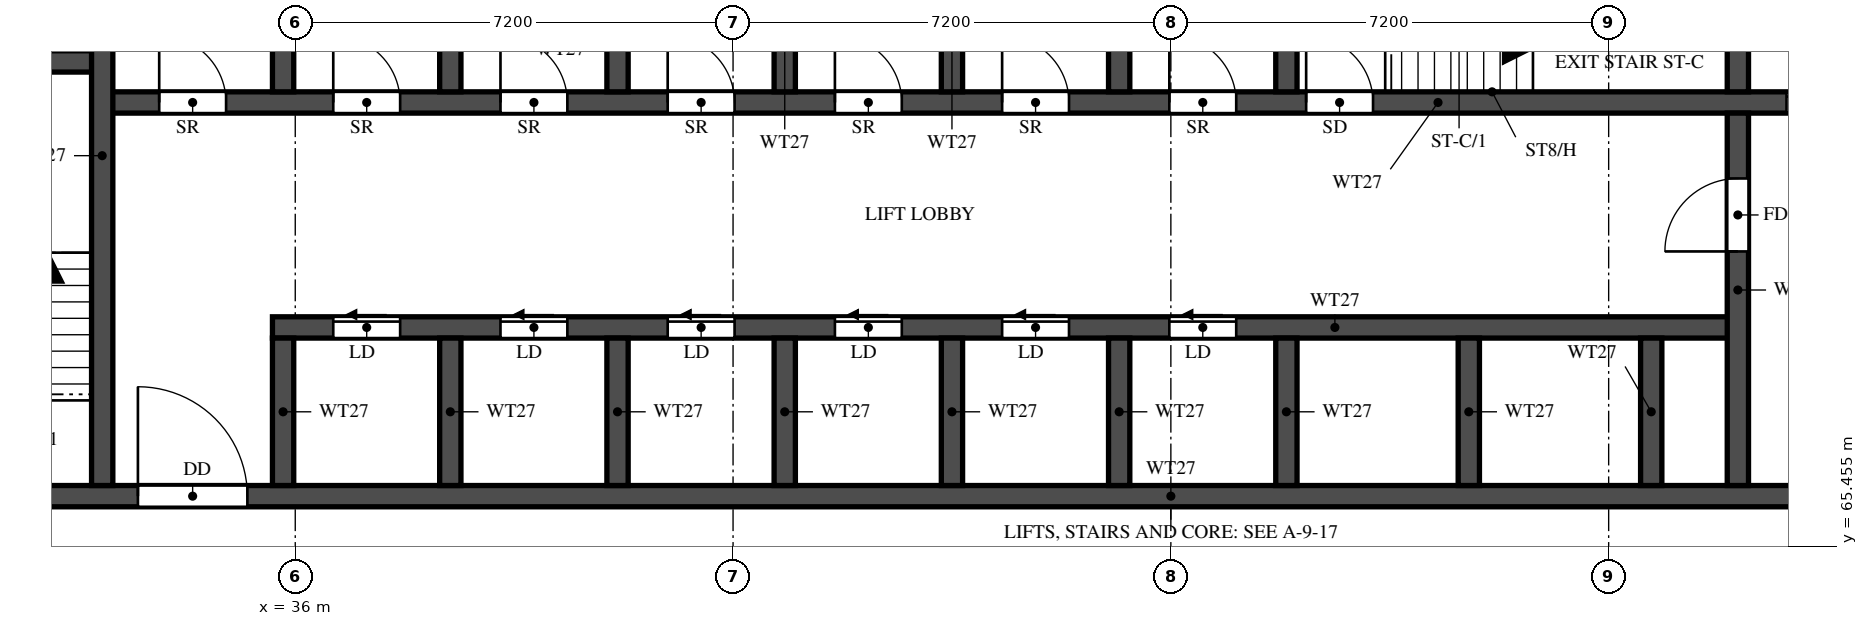
"""IFC4 building model, lengths in metres.
Left out: names, types, materials, properties, quantities, classifications, styles, units other than length and angle.
Written with IfcOpenShell. Run it as: python <this file> out.ifc"""

import sys

from ifc_helpers import new_model, si_unit, direction, frame, frame_2d, origin, place, context, subcontext, project, spatial, rectangle, extrude, element, fill, save


model = new_model("IFC4")
c1 = context("Model", 3, precision=1e-05, world=origin(), true_north=direction((0.0, 1.0)))
c2 = subcontext(c1, "Body", "Model", "MODEL_VIEW")
j1 = project(units=[si_unit("LENGTHUNIT", "METRE"), si_unit("PLANEANGLEUNIT", "RADIAN")], contexts=[c1])
p1 = place(None, origin())
s1 = spatial("IfcSite", under=j1, at=p1, CompositionType="ELEMENT")
p2 = place(p1, origin())
s2 = spatial("IfcBuilding", under=s1, at=p2, CompositionType="ELEMENT")
p3 = place(p2, frame((0.0, 0.0, 113.0)))
s3 = spatial("IfcBuildingStorey", under=s2, at=p3, CompositionType="ELEMENT", Elevation=113.0)
p4 = place(p3, frame((29.7, 66.275, 0.0), z_axis=(0.0, 0.0, 1.0), x_axis=(1.0, 0.0, 0.0)))
e1 = element("IfcWall", 1, at=p4, inside=s3, PredefinedType="SHEAR", context=c2, shape_type="SweptSolid", body=[
    extrude(rectangle(XDim=41.4, YDim=0.35, at=frame_2d((20.7, 0.0))), origin(), (0.0, 0.0, 1.0), 3.2),
])
p5 = place(p4, frame((0.925, 0.0, 0.0)))
e2 = element("IfcOpeningElement", 2, at=p5, cuts=e1, PredefinedType="OPENING", context=c2, shape_type="SweptSolid", body=[
    extrude(rectangle(XDim=1.1, YDim=2.1, at=frame_2d((0.55, 1.05))), frame((0.0, 0.185, 0.0), z_axis=(0.0, -1.0, 0.0), x_axis=(1.0, 0.0, 0.0)), (0.0, 0.0, 1.0), 0.37),
])
p6 = place(p4, frame((3.712, 0.0, 0.0)))
e3 = element("IfcOpeningElement", 3, at=p6, cuts=e1, PredefinedType="OPENING", context=c2, shape_type="SweptSolid", body=[
    extrude(rectangle(XDim=1.8, YDim=2.1, at=frame_2d((0.9, 1.05))), frame((0.0, 0.185, 0.0), z_axis=(0.0, -1.0, 0.0), x_axis=(1.0, 0.0, 0.0)), (0.0, 0.0, 1.0), 0.37),
])
p7 = place(p3, frame((35.625, 69.05, 0.0), z_axis=(0.0, 0.0, 1.0), x_axis=(1.0, 0.0, 0.0)))
e4 = element("IfcWall", 4, at=p7, inside=s3, PredefinedType="SHEAR", context=c2, shape_type="SweptSolid", body=[
    extrude(rectangle(XDim=24.1, YDim=0.35, at=frame_2d((12.05, 0.0))), origin(), (0.0, 0.0, 1.0), 3.2),
])
p8 = place(p7, frame((1.0, 0.0, 0.0)))
e5 = element("IfcOpeningElement", 5, at=p8, cuts=e4, PredefinedType="OPENING", context=c2, shape_type="SweptSolid", body=[
    extrude(rectangle(XDim=1.1, YDim=2.1, at=frame_2d((0.55, 1.05))), frame((0.0, 0.185, 0.0), z_axis=(0.0, -1.0, 0.0), x_axis=(1.0, 0.0, 0.0)), (0.0, 0.0, 1.0), 0.37),
])
p9 = place(p7, frame((3.75, 0.0, 0.0)))
e6 = element("IfcOpeningElement", 6, at=p9, cuts=e4, PredefinedType="OPENING", context=c2, shape_type="SweptSolid", body=[
    extrude(rectangle(XDim=1.1, YDim=2.1, at=frame_2d((0.55, 1.05))), frame((0.0, 0.185, 0.0), z_axis=(0.0, -1.0, 0.0), x_axis=(1.0, 0.0, 0.0)), (0.0, 0.0, 1.0), 0.37),
])
p10 = place(p7, frame((6.5, 0.0, 0.0)))
e7 = element("IfcOpeningElement", 7, at=p10, cuts=e4, PredefinedType="OPENING", context=c2, shape_type="SweptSolid", body=[
    extrude(rectangle(XDim=1.1, YDim=2.1, at=frame_2d((0.55, 1.05))), frame((0.0, 0.185, 0.0), z_axis=(0.0, -1.0, 0.0), x_axis=(1.0, 0.0, 0.0)), (0.0, 0.0, 1.0), 0.37),
])
p11 = place(p7, frame((9.25, 0.0, 0.0)))
e8 = element("IfcOpeningElement", 8, at=p11, cuts=e4, PredefinedType="OPENING", context=c2, shape_type="SweptSolid", body=[
    extrude(rectangle(XDim=1.1, YDim=2.1, at=frame_2d((0.55, 1.05))), frame((0.0, 0.185, 0.0), z_axis=(0.0, -1.0, 0.0), x_axis=(1.0, 0.0, 0.0)), (0.0, 0.0, 1.0), 0.37),
])
p12 = place(p7, frame((12.0, 0.0, 0.0)))
e9 = element("IfcOpeningElement", 9, at=p12, cuts=e4, PredefinedType="OPENING", context=c2, shape_type="SweptSolid", body=[
    extrude(rectangle(XDim=1.1, YDim=2.1, at=frame_2d((0.55, 1.05))), frame((0.0, 0.185, 0.0), z_axis=(0.0, -1.0, 0.0), x_axis=(1.0, 0.0, 0.0)), (0.0, 0.0, 1.0), 0.37),
])
p13 = place(p7, frame((14.75, 0.0, 0.0)))
e10 = element("IfcOpeningElement", 10, at=p13, cuts=e4, PredefinedType="OPENING", context=c2, shape_type="SweptSolid", body=[
    extrude(rectangle(XDim=1.1, YDim=2.1, at=frame_2d((0.55, 1.05))), frame((0.0, 0.185, 0.0), z_axis=(0.0, -1.0, 0.0), x_axis=(1.0, 0.0, 0.0)), (0.0, 0.0, 1.0), 0.37),
])
p14 = place(p3, frame((32.825, 72.75, 0.0), z_axis=(0.0, 0.0, 1.0), x_axis=(1.0, 0.0, 0.0)))
e11 = element("IfcWall", 11, at=p14, inside=s3, PredefinedType="SHEAR", context=c2, shape_type="SweptSolid", body=[
    extrude(rectangle(XDim=35.15, YDim=0.35, at=frame_2d((17.575, 0.0))), origin(), (0.0, 0.0, 1.0), 3.2),
])
p15 = place(p14, frame((19.8, 0.0, 0.0)))
e12 = element("IfcOpeningElement", 12, at=p15, cuts=e11, PredefinedType="OPENING", context=c2, shape_type="SweptSolid", body=[
    extrude(rectangle(XDim=1.1, YDim=2.1, at=frame_2d((0.55, 1.05))), frame((0.0, 0.185, 0.0), z_axis=(0.0, -1.0, 0.0), x_axis=(1.0, 0.0, 0.0)), (0.0, 0.0, 1.0), 0.37),
])
p16 = place(p14, frame((27.7, 0.0, 0.0)))
e13 = element("IfcOpeningElement", 13, at=p16, cuts=e11, PredefinedType="OPENING", context=c2, shape_type="SweptSolid", body=[
    extrude(rectangle(XDim=1.1, YDim=2.1, at=frame_2d((0.55, 1.05))), frame((0.0, 0.185, 0.0), z_axis=(0.0, -1.0, 0.0), x_axis=(1.0, 0.0, 0.0)), (0.0, 0.0, 1.0), 0.37),
])
p17 = place(p14, frame((30.3, 0.0, 0.0)))
e14 = element("IfcOpeningElement", 14, at=p17, cuts=e11, PredefinedType="OPENING", context=c2, shape_type="SweptSolid", body=[
    extrude(rectangle(XDim=1.1, YDim=2.1, at=frame_2d((0.55, 1.05))), frame((0.0, 0.185, 0.0), z_axis=(0.0, -1.0, 0.0), x_axis=(1.0, 0.0, 0.0)), (0.0, 0.0, 1.0), 0.37),
])
p18 = place(p14, frame((3.8, 0.0, 0.0)))
e15 = element("IfcOpeningElement", 15, at=p18, cuts=e11, PredefinedType="OPENING", context=c2, shape_type="SweptSolid", body=[
    extrude(rectangle(XDim=1.1, YDim=2.1, at=frame_2d((0.55, 1.05))), frame((0.0, 0.185, 0.0), z_axis=(0.0, -1.0, 0.0), x_axis=(1.0, 0.0, 0.0)), (0.0, 0.0, 1.0), 0.37),
])
p19 = place(p14, frame((6.55, 0.0, 0.0)))
e16 = element("IfcOpeningElement", 16, at=p19, cuts=e11, PredefinedType="OPENING", context=c2, shape_type="SweptSolid", body=[
    extrude(rectangle(XDim=1.1, YDim=2.1, at=frame_2d((0.55, 1.05))), frame((0.0, 0.185, 0.0), z_axis=(0.0, -1.0, 0.0), x_axis=(1.0, 0.0, 0.0)), (0.0, 0.0, 1.0), 0.37),
])
p20 = place(p14, frame((9.3, 0.0, 0.0)))
e17 = element("IfcOpeningElement", 17, at=p20, cuts=e11, PredefinedType="OPENING", context=c2, shape_type="SweptSolid", body=[
    extrude(rectangle(XDim=1.1, YDim=2.1, at=frame_2d((0.55, 1.05))), frame((0.0, 0.185, 0.0), z_axis=(0.0, -1.0, 0.0), x_axis=(1.0, 0.0, 0.0)), (0.0, 0.0, 1.0), 0.37),
])
p21 = place(p14, frame((12.05, 0.0, 0.0)))
e18 = element("IfcOpeningElement", 18, at=p21, cuts=e11, PredefinedType="OPENING", context=c2, shape_type="SweptSolid", body=[
    extrude(rectangle(XDim=1.1, YDim=2.1, at=frame_2d((0.55, 1.05))), frame((0.0, 0.185, 0.0), z_axis=(0.0, -1.0, 0.0), x_axis=(1.0, 0.0, 0.0)), (0.0, 0.0, 1.0), 0.37),
])
p22 = place(p14, frame((14.8, 0.0, 0.0)))
e19 = element("IfcOpeningElement", 19, at=p22, cuts=e11, PredefinedType="OPENING", context=c2, shape_type="SweptSolid", body=[
    extrude(rectangle(XDim=1.1, YDim=2.1, at=frame_2d((0.55, 1.05))), frame((0.0, 0.185, 0.0), z_axis=(0.0, -1.0, 0.0), x_axis=(1.0, 0.0, 0.0)), (0.0, 0.0, 1.0), 0.37),
])
p23 = place(p14, frame((17.55, 0.0, 0.0)))
e20 = element("IfcOpeningElement", 20, at=p23, cuts=e11, PredefinedType="OPENING", context=c2, shape_type="SweptSolid", body=[
    extrude(rectangle(XDim=1.1, YDim=2.1, at=frame_2d((0.55, 1.05))), frame((0.0, 0.185, 0.0), z_axis=(0.0, -1.0, 0.0), x_axis=(1.0, 0.0, 0.0)), (0.0, 0.0, 1.0), 0.37),
])
p24 = place(p14, frame((0.938, 0.0, 0.0)))
e21 = element("IfcOpeningElement", 21, at=p24, cuts=e11, PredefinedType="OPENING", context=c2, shape_type="SweptSolid", body=[
    extrude(rectangle(XDim=1.1, YDim=2.1, at=frame_2d((0.55, 1.05))), frame((0.0, 0.185, 0.0), z_axis=(0.0, -1.0, 0.0), x_axis=(1.0, 0.0, 0.0)), (0.0, 0.0, 1.0), 0.37),
])
p25 = place(p3, frame((29.7, 73.425, 0.0), z_axis=(0.0, 0.0, 1.0), x_axis=(1.0, 0.0, 0.0)))
e22 = element("IfcWall", 22, at=p25, inside=s3, PredefinedType="SHEAR", context=c2, shape_type="SweptSolid", body=[
    extrude(rectangle(XDim=3.125, YDim=0.35, at=frame_2d((1.562, 0.0))), origin(), (0.0, 0.0, 1.0), 3.2),
])
p26 = place(p3, frame((32.825, 66.45, 0.0), z_axis=(0.0, 0.0, 1.0), x_axis=(0.0, 1.0, 0.0)))
e23 = element("IfcWall", 23, at=p26, inside=s3, PredefinedType="SHEAR", context=c2, shape_type="SweptSolid", body=[
    extrude(rectangle(XDim=10.85, YDim=0.35, at=frame_2d((5.425, 0.0))), origin(), (0.0, 0.0, 1.0), 3.2),
])
p27 = place(p3, frame((59.725, 66.45, 0.0), z_axis=(0.0, 0.0, 1.0), x_axis=(0.0, 1.0, 0.0)))
e24 = element("IfcWall", 24, at=p27, inside=s3, PredefinedType="SHEAR", context=c2, shape_type="SweptSolid", body=[
    extrude(rectangle(XDim=6.125, YDim=0.35, at=frame_2d((3.062, 0.0))), origin(), (0.0, 0.0, 1.0), 3.2),
])
p28 = place(p27, frame((3.85, 0.0, 0.0)))
e25 = element("IfcOpeningElement", 25, at=p28, cuts=e24, PredefinedType="OPENING", context=c2, shape_type="SweptSolid", body=[
    extrude(rectangle(XDim=1.2, YDim=2.1, at=frame_2d((0.6, 1.05))), frame((0.0, 0.185, 0.0), z_axis=(0.0, -1.0, 0.0), x_axis=(1.0, 0.0, 0.0)), (0.0, 0.0, 1.0), 0.37),
])
p29 = place(p3, frame((59.725, 72.925, 0.0), z_axis=(0.0, 0.0, 1.0), x_axis=(0.0, 1.0, 0.0)))
e26 = element("IfcWall", 26, at=p29, inside=s3, PredefinedType="SHEAR", context=c2, shape_type="SweptSolid", body=[
    extrude(rectangle(XDim=2.95, YDim=0.35, at=frame_2d((1.475, 0.0))), origin(), (0.0, 0.0, 1.0), 3.2),
])
for number, where, z_axis, x_axis in (
    (27, (35.8, 66.45, 0.0), (0.0, 0.0, 1.0), (0.0, 1.0, 0.0)),
    (28, (38.55, 66.45, 0.0), (0.0, 0.0, 1.0), (0.0, 1.0, 0.0)),
    (29, (41.3, 66.45, 0.0), (0.0, 0.0, 1.0), (0.0, 1.0, 0.0)),
    (30, (44.05, 66.45, 0.0), (0.0, 0.0, 1.0), (0.0, 1.0, 0.0)),
    (31, (46.8, 66.45, 0.0), (0.0, 0.0, 1.0), (0.0, 1.0, 0.0)),
    (32, (49.55, 66.45, 0.0), (0.0, 0.0, 1.0), (0.0, 1.0, 0.0)),
    (33, (52.3, 66.45, 0.0), (0.0, 0.0, 1.0), (0.0, 1.0, 0.0)),
    (34, (55.3, 66.45, 0.0), (0.0, 0.0, 1.0), (0.0, 1.0, 0.0)),
    (35, (58.3, 66.45, 0.0), (0.0, 0.0, 1.0), (0.0, 1.0, 0.0)),
):
    element("IfcWall", number, at=place(p3, frame(where, z_axis=z_axis, x_axis=x_axis)), inside=s3, PredefinedType="SHEAR", context=c2, shape_type="SweptSolid", body=[
        extrude(rectangle(XDim=2.425, YDim=0.35, at=frame_2d((1.212, 0.0))), origin(), (0.0, 0.0, 1.0), 3.2),
    ])
for number, where, z_axis, x_axis in (
    (36, (35.8, 72.925, 0.0), (0.0, 0.0, 1.0), (0.0, 1.0, 0.0)),
    (37, (38.55, 72.925, 0.0), (0.0, 0.0, 1.0), (0.0, 1.0, 0.0)),
    (38, (41.3, 72.925, 0.0), (0.0, 0.0, 1.0), (0.0, 1.0, 0.0)),
    (39, (44.05, 72.925, 0.0), (0.0, 0.0, 1.0), (0.0, 1.0, 0.0)),
    (40, (46.8, 72.925, 0.0), (0.0, 0.0, 1.0), (0.0, 1.0, 0.0)),
    (41, (49.55, 72.925, 0.0), (0.0, 0.0, 1.0), (0.0, 1.0, 0.0)),
    (42, (52.3, 72.925, 0.0), (0.0, 0.0, 1.0), (0.0, 1.0, 0.0)),
):
    element("IfcWall", number, at=place(p3, frame(where, z_axis=z_axis, x_axis=x_axis)), inside=s3, PredefinedType="SHEAR", context=c2, shape_type="SweptSolid", body=[
        extrude(rectangle(XDim=2.95, YDim=0.35, at=frame_2d((1.475, 0.0))), origin(), (0.0, 0.0, 1.0), 3.2),
    ])
p30 = place(p15, origin())
e43 = element("IfcDoor", 43, at=p30, inside=s3, OperationType="SINGLE_SWING_LEFT", PredefinedType="DOOR", context=c2, shape_type="SweptSolid", body=[
    extrude(rectangle(XDim=1.1, YDim=2.1, at=frame_2d((0.55, 1.05))), frame((0.0, 0.025, 0.0), z_axis=(0.0, -1.0, 0.0), x_axis=(1.0, 0.0, 0.0)), (0.0, 0.0, 1.0), 0.05),
])
fill(e12, e43)
p31 = place(p6, origin())
e44 = element("IfcDoor", 44, at=p31, inside=s3, OperationType="DOUBLE_DOOR_SINGLE_SWING", PredefinedType="DOOR", context=c2, shape_type="SweptSolid", body=[
    extrude(rectangle(XDim=1.8, YDim=2.1, at=frame_2d((0.9, 1.05))), frame((0.0, 0.025, 0.0), z_axis=(0.0, -1.0, 0.0), x_axis=(1.0, 0.0, 0.0)), (0.0, 0.0, 1.0), 0.05),
])
fill(e3, e44)
p32 = place(p28, origin())
e45 = element("IfcDoor", 45, at=p32, inside=s3, OperationType="SINGLE_SWING_LEFT", PredefinedType="DOOR", context=c2, shape_type="SweptSolid", body=[
    extrude(rectangle(XDim=1.2, YDim=2.1, at=frame_2d((0.6, 1.05))), frame((0.0, 0.025, 0.0), z_axis=(0.0, -1.0, 0.0), x_axis=(1.0, 0.0, 0.0)), (0.0, 0.0, 1.0), 0.05),
])
fill(e25, e45)
p33 = place(p16, origin())
e46 = element("IfcDoor", 46, at=p33, inside=s3, OperationType="SLIDING_TO_LEFT", PredefinedType="DOOR", context=c2, shape_type="SweptSolid", body=[
    extrude(rectangle(XDim=1.1, YDim=2.1, at=frame_2d((0.55, 1.05))), frame((0.0, 0.025, 0.0), z_axis=(0.0, -1.0, 0.0), x_axis=(1.0, 0.0, 0.0)), (0.0, 0.0, 1.0), 0.05),
])
fill(e13, e46)
p34 = place(p8, origin())
e47 = element("IfcDoor", 47, at=p34, inside=s3, OperationType="SLIDING_TO_LEFT", PredefinedType="DOOR", context=c2, shape_type="SweptSolid", body=[
    extrude(rectangle(XDim=1.1, YDim=2.1, at=frame_2d((0.55, 1.05))), frame((0.0, 0.025, 0.0), z_axis=(0.0, -1.0, 0.0), x_axis=(1.0, 0.0, 0.0)), (0.0, 0.0, 1.0), 0.05),
])
fill(e5, e47)
p35 = place(p9, origin())
e48 = element("IfcDoor", 48, at=p35, inside=s3, OperationType="SLIDING_TO_LEFT", PredefinedType="DOOR", context=c2, shape_type="SweptSolid", body=[
    extrude(rectangle(XDim=1.1, YDim=2.1, at=frame_2d((0.55, 1.05))), frame((0.0, 0.025, 0.0), z_axis=(0.0, -1.0, 0.0), x_axis=(1.0, 0.0, 0.0)), (0.0, 0.0, 1.0), 0.05),
])
fill(e6, e48)
p36 = place(p10, origin())
e49 = element("IfcDoor", 49, at=p36, inside=s3, OperationType="SLIDING_TO_LEFT", PredefinedType="DOOR", context=c2, shape_type="SweptSolid", body=[
    extrude(rectangle(XDim=1.1, YDim=2.1, at=frame_2d((0.55, 1.05))), frame((0.0, 0.025, 0.0), z_axis=(0.0, -1.0, 0.0), x_axis=(1.0, 0.0, 0.0)), (0.0, 0.0, 1.0), 0.05),
])
fill(e7, e49)
p37 = place(p11, origin())
e50 = element("IfcDoor", 50, at=p37, inside=s3, OperationType="SLIDING_TO_LEFT", PredefinedType="DOOR", context=c2, shape_type="SweptSolid", body=[
    extrude(rectangle(XDim=1.1, YDim=2.1, at=frame_2d((0.55, 1.05))), frame((0.0, 0.025, 0.0), z_axis=(0.0, -1.0, 0.0), x_axis=(1.0, 0.0, 0.0)), (0.0, 0.0, 1.0), 0.05),
])
fill(e8, e50)
p38 = place(p12, origin())
e51 = element("IfcDoor", 51, at=p38, inside=s3, OperationType="SLIDING_TO_LEFT", PredefinedType="DOOR", context=c2, shape_type="SweptSolid", body=[
    extrude(rectangle(XDim=1.1, YDim=2.1, at=frame_2d((0.55, 1.05))), frame((0.0, 0.025, 0.0), z_axis=(0.0, -1.0, 0.0), x_axis=(1.0, 0.0, 0.0)), (0.0, 0.0, 1.0), 0.05),
])
fill(e9, e51)
p39 = place(p13, origin())
e52 = element("IfcDoor", 52, at=p39, inside=s3, OperationType="SLIDING_TO_LEFT", PredefinedType="DOOR", context=c2, shape_type="SweptSolid", body=[
    extrude(rectangle(XDim=1.1, YDim=2.1, at=frame_2d((0.55, 1.05))), frame((0.0, 0.025, 0.0), z_axis=(0.0, -1.0, 0.0), x_axis=(1.0, 0.0, 0.0)), (0.0, 0.0, 1.0), 0.05),
])
fill(e10, e52)
p40 = place(p18, origin())
e53 = element("IfcDoor", 53, at=p40, inside=s3, OperationType="SINGLE_SWING_LEFT", PredefinedType="DOOR", context=c2, shape_type="SweptSolid", body=[
    extrude(rectangle(XDim=1.1, YDim=2.1, at=frame_2d((0.55, 1.05))), frame((0.0, 0.025, 0.0), z_axis=(0.0, -1.0, 0.0), x_axis=(1.0, 0.0, 0.0)), (0.0, 0.0, 1.0), 0.05),
])
fill(e15, e53)
p41 = place(p19, origin())
e54 = element("IfcDoor", 54, at=p41, inside=s3, OperationType="SINGLE_SWING_RIGHT", PredefinedType="DOOR", context=c2, shape_type="SweptSolid", body=[
    extrude(rectangle(XDim=1.1, YDim=2.1, at=frame_2d((0.55, 1.05))), frame((0.0, 0.025, 0.0), z_axis=(0.0, -1.0, 0.0), x_axis=(1.0, 0.0, 0.0)), (0.0, 0.0, 1.0), 0.05),
])
fill(e16, e54)
p42 = place(p20, origin())
e55 = element("IfcDoor", 55, at=p42, inside=s3, OperationType="SINGLE_SWING_LEFT", PredefinedType="DOOR", context=c2, shape_type="SweptSolid", body=[
    extrude(rectangle(XDim=1.1, YDim=2.1, at=frame_2d((0.55, 1.05))), frame((0.0, 0.025, 0.0), z_axis=(0.0, -1.0, 0.0), x_axis=(1.0, 0.0, 0.0)), (0.0, 0.0, 1.0), 0.05),
])
fill(e17, e55)
p43 = place(p21, origin())
e56 = element("IfcDoor", 56, at=p43, inside=s3, OperationType="SINGLE_SWING_RIGHT", PredefinedType="DOOR", context=c2, shape_type="SweptSolid", body=[
    extrude(rectangle(XDim=1.1, YDim=2.1, at=frame_2d((0.55, 1.05))), frame((0.0, 0.025, 0.0), z_axis=(0.0, -1.0, 0.0), x_axis=(1.0, 0.0, 0.0)), (0.0, 0.0, 1.0), 0.05),
])
fill(e18, e56)
p44 = place(p22, origin())
e57 = element("IfcDoor", 57, at=p44, inside=s3, OperationType="SINGLE_SWING_LEFT", PredefinedType="DOOR", context=c2, shape_type="SweptSolid", body=[
    extrude(rectangle(XDim=1.1, YDim=2.1, at=frame_2d((0.55, 1.05))), frame((0.0, 0.025, 0.0), z_axis=(0.0, -1.0, 0.0), x_axis=(1.0, 0.0, 0.0)), (0.0, 0.0, 1.0), 0.05),
])
fill(e19, e57)
p45 = place(p23, origin())
e58 = element("IfcDoor", 58, at=p45, inside=s3, OperationType="SINGLE_SWING_RIGHT", PredefinedType="DOOR", context=c2, shape_type="SweptSolid", body=[
    extrude(rectangle(XDim=1.1, YDim=2.1, at=frame_2d((0.55, 1.05))), frame((0.0, 0.025, 0.0), z_axis=(0.0, -1.0, 0.0), x_axis=(1.0, 0.0, 0.0)), (0.0, 0.0, 1.0), 0.05),
])
fill(e20, e58)
p46 = place(p24, origin())
e59 = element("IfcDoor", 59, at=p46, inside=s3, OperationType="SINGLE_SWING_LEFT", PredefinedType="DOOR", context=c2, shape_type="SweptSolid", body=[
    extrude(rectangle(XDim=1.1, YDim=2.1, at=frame_2d((0.55, 1.05))), frame((0.0, 0.025, 0.0), z_axis=(0.0, -1.0, 0.0), x_axis=(1.0, 0.0, 0.0)), (0.0, 0.0, 1.0), 0.05),
])
fill(e21, e59)
save(model, sys.argv[1])
